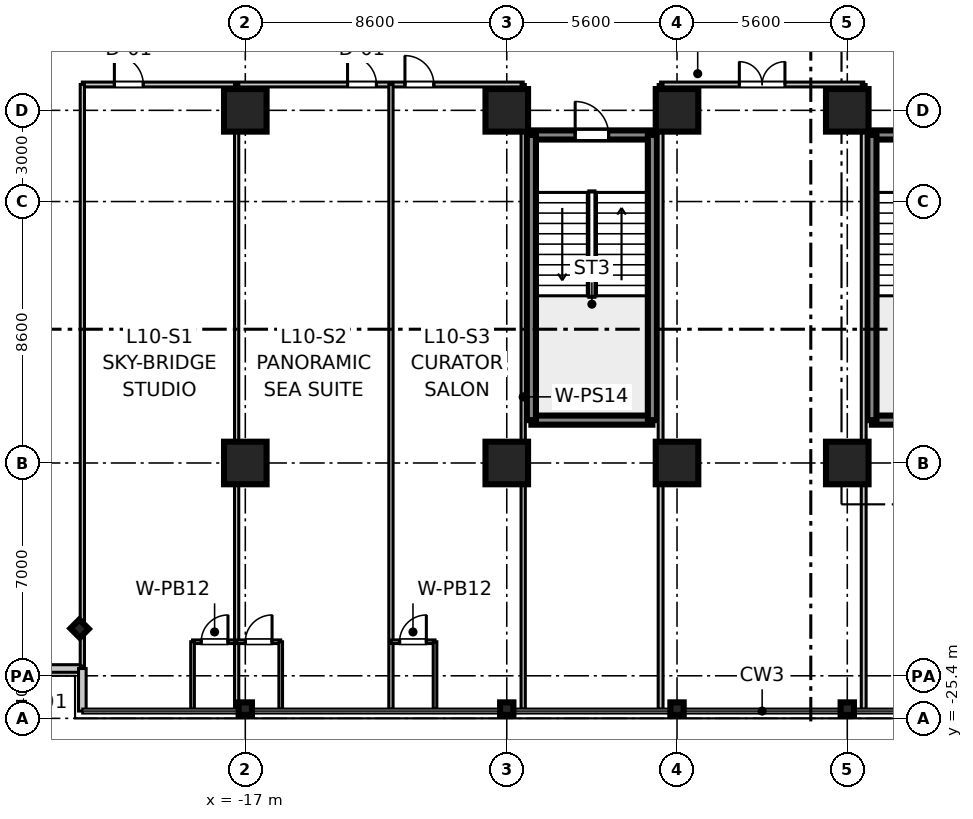
"""IFC4 building model, lengths in metres.
Left out: names, types, materials, properties, quantities, classifications, styles, units other than length and angle.
Written with IfcOpenShell. Run it as: python <this file> out.ifc"""

import sys

from ifc_helpers import new_model, si_unit, direction, frame, frame_2d, origin, origin_2d, place, context, subcontext, project, spatial, rectangle, i_section, extrude, source, transform, mapped, element, fill, save


model = new_model("IFC4")
c1 = context("Model", 3, precision=1e-05, world=origin(), true_north=direction((0.0, 1.0)))
c2 = subcontext(c1, "Body", "Model", "MODEL_VIEW")
j1 = project(units=[si_unit("LENGTHUNIT", "METRE"), si_unit("PLANEANGLEUNIT", "RADIAN")], contexts=[c1])
p1 = place(None, origin())
s1 = spatial("IfcSite", under=j1, at=p1, CompositionType="ELEMENT")
p2 = place(p1, origin())
s2 = spatial("IfcBuilding", under=s1, at=p2, CompositionType="ELEMENT")
p3 = place(p2, frame((0.0, 0.0, 47.0)))
s3 = spatial("IfcBuildingStorey", under=s2, at=p3, CompositionType="ELEMENT", Elevation=47.0)
m1 = source(origin(), c2, "Body", "SweptSolid", [
    extrude(rectangle(XDim=1.4, YDim=1.4, at=origin_2d()), origin(), (0.0, 0.0, 1.0), 3.605),
])
for number, where, z_axis, x_axis in (
    (1, (-17.0, -17.0, 0.0), (0.0, 0.0, 1.0), (1.0, 0.0, 0.0)),
    (2, (-17.0, -5.4, 0.0), (0.0, 0.0, 1.0), (1.0, 0.0, 0.0)),
    (3, (-8.4, -17.0, 0.0), (0.0, 0.0, 1.0), (1.0, 0.0, 0.0)),
    (4, (-8.4, -5.4, 0.0), (0.0, 0.0, 1.0), (1.0, 0.0, 0.0)),
    (5, (-2.8, -17.0, 0.0), (0.0, 0.0, 1.0), (1.0, 0.0, 0.0)),
    (6, (-2.8, -5.4, 0.0), (0.0, 0.0, 1.0), (1.0, 0.0, 0.0)),
    (7, (2.8, -17.0, 0.0), (0.0, 0.0, 1.0), (1.0, 0.0, 0.0)),
    (8, (2.8, -5.4, 0.0), (0.0, 0.0, 1.0), (1.0, 0.0, 0.0)),
):
    element("IfcColumn", number, at=place(p3, frame(where, z_axis=z_axis, x_axis=x_axis)), inside=s3, PredefinedType="COLUMN", context=c2, shape_type="MappedRepresentation", body=[
        mapped(m1, transform((0.0, 0.0, 0.0), scale=1.0)),
    ])
m2 = source(origin(), c2, "Body", "SweptSolid", [
    extrude(i_section(OverallWidth=0.412, OverallDepth=0.438, WebThickness=0.023, FlangeThickness=0.036, at=origin_2d()), origin(), (0.0, 0.0, 1.0), 3.605),
])
for number, where, z_axis, x_axis in (
    (9, (-17.0, -25.08, 0.0), (0.0, 0.0, 1.0), (0.0, 1.0, 0.0)),
    (10, (-8.4, -25.08, 0.0), (0.0, 0.0, 1.0), (0.0, 1.0, 0.0)),
    (11, (-2.8, -25.08, 0.0), (0.0, 0.0, 1.0), (0.0, 1.0, 0.0)),
    (12, (2.8, -25.08, 0.0), (0.0, 0.0, 1.0), (0.0, 1.0, 0.0)),
    (13, (-22.45, -22.45, 0.0), (0.0, 0.0, 1.0), (0.707, 0.707, 0.0)),
):
    element("IfcColumn", number, at=place(p3, frame(where, z_axis=z_axis, x_axis=x_axis)), inside=s3, PredefinedType="COLUMN", context=c2, shape_type="MappedRepresentation", body=[
        mapped(m2, transform((0.0, 0.0, 0.0), scale=1.0)),
    ])
m3 = source(origin(), c2, "Body", "SweptSolid", [
    extrude(rectangle(XDim=3.98, YDim=0.3, at=frame_2d((1.99, 0.0))), origin(), (0.0, 0.0, 1.0), 3.37),
])
for number, where, z_axis, x_axis in (
    (14, (3.61, -15.59, 0.0), (0.0, 0.0, 1.0), (1.0, 0.0, 0.0)),
    (15, (3.61, -6.21, 0.0), (0.0, 0.0, 1.0), (1.0, 0.0, 0.0)),
):
    element("IfcWall", number, at=place(p3, frame(where, z_axis=z_axis, x_axis=x_axis)), inside=s3, PredefinedType="SHEAR", context=c2, shape_type="MappedRepresentation", body=[
        mapped(m3, transform((0.0, 0.0, 0.0), scale=1.0)),
    ])
m4 = source(origin(), c2, "Body", "SweptSolid", [
    extrude(rectangle(XDim=9.38, YDim=0.3, at=frame_2d((4.69, 0.0))), origin(), (0.0, 0.0, 1.0), 3.37),
])
p4 = place(p3, frame((3.61, -15.59, 0.0), z_axis=(0.0, 0.0, 1.0), x_axis=(0.0, 1.0, 0.0)))
e16 = element("IfcWall", 16, at=p4, inside=s3, PredefinedType="SHEAR", context=c2, shape_type="MappedRepresentation", body=[
    mapped(m4, transform((0.0, 0.0, 0.0), scale=1.0)),
])
p5 = place(p3, frame((-7.59, -15.59, 0.0), z_axis=(0.0, 0.0, 1.0), x_axis=(1.0, 0.0, 0.0)))
e17 = element("IfcWall", 17, at=p5, inside=s3, PredefinedType="SHEAR", context=c2, shape_type="MappedRepresentation", body=[
    mapped(m3, transform((0.0, 0.0, 0.0), scale=1.0)),
])
p6 = place(p3, frame((-7.59, -6.21, 0.0), z_axis=(0.0, 0.0, 1.0), x_axis=(1.0, 0.0, 0.0)))
e18 = element("IfcWall", 18, at=p6, inside=s3, PredefinedType="SHEAR", context=c2, shape_type="MappedRepresentation", body=[
    mapped(m3, transform((0.0, 0.0, 0.0), scale=1.0)),
])
p7 = place(p6, frame((1.44, 0.0, 0.0)))
e19 = element("IfcOpeningElement", 19, at=p7, cuts=e18, PredefinedType="OPENING", context=c2, shape_type="SweptSolid", body=[
    extrude(rectangle(XDim=1.1, YDim=2.15, at=frame_2d((0.55, 1.075))), frame((0.0, 0.16, 0.0), z_axis=(0.0, -1.0, 0.0), x_axis=(1.0, 0.0, 0.0)), (0.0, 0.0, 1.0), 0.32),
])
for number, where, z_axis, x_axis in (
    (20, (-7.59, -15.59, 0.0), (0.0, 0.0, 1.0), (0.0, 1.0, 0.0)),
    (21, (-3.61, -15.59, 0.0), (0.0, 0.0, 1.0), (0.0, 1.0, 0.0)),
):
    element("IfcWall", number, at=place(p3, frame(where, z_axis=z_axis, x_axis=x_axis)), inside=s3, PredefinedType="SHEAR", context=c2, shape_type="MappedRepresentation", body=[
        mapped(m4, transform((0.0, 0.0, 0.0), scale=1.0)),
    ])
m5 = source(origin(), c2, "Body", "SweptSolid", [
    extrude(rectangle(XDim=1.4, YDim=0.25, at=frame_2d((0.7, 0.0))), origin(), (0.0, 0.0, 1.0), 3.37),
])
for number, where, z_axis, x_axis in (
    (22, (-23.76, -23.76, 0.0), (0.0, 0.0, 1.0), (1.0, 0.0, 0.0)),
    (23, (-22.36, -25.16, 0.0), (0.0, 0.0, 1.0), (0.0, 1.0, 0.0)),
):
    element("IfcWall", number, at=place(p3, frame(where, z_axis=z_axis, x_axis=x_axis)), inside=s3, PredefinedType="STANDARD", context=c2, shape_type="MappedRepresentation", body=[
        mapped(m5, transform((0.0, 0.0, 0.0), scale=1.0)),
    ])
m6 = source(origin(), c2, "Body", "SweptSolid", [
    extrude(rectangle(XDim=14.5, YDim=0.16, at=frame_2d((7.25, 0.0))), origin(), (0.0, 0.0, 1.0), 2.71),
])
p8 = place(p3, frame((-22.36, -4.55, 0.0), z_axis=(0.0, 0.0, 1.0), x_axis=(1.0, 0.0, 0.0)))
e24 = element("IfcWall", 24, at=p8, inside=s3, PredefinedType="PARTITIONING", context=c2, shape_type="MappedRepresentation", body=[
    mapped(m6, transform((0.0, 0.0, 0.0), scale=1.0)),
])
p9 = place(p8, frame((1.054, 0.0, 0.0)))
e25 = element("IfcOpeningElement", 25, at=p9, cuts=e24, PredefinedType="OPENING", context=c2, shape_type="SweptSolid", body=[
    extrude(rectangle(XDim=0.95, YDim=2.1, at=frame_2d((0.475, 1.05))), frame((0.0, 0.09, 0.0), z_axis=(0.0, -1.0, 0.0), x_axis=(1.0, 0.0, 0.0)), (0.0, 0.0, 1.0), 0.18),
])
p10 = place(p8, frame((8.723, 0.0, 0.0)))
e26 = element("IfcOpeningElement", 26, at=p10, cuts=e24, PredefinedType="OPENING", context=c2, shape_type="SweptSolid", body=[
    extrude(rectangle(XDim=0.95, YDim=2.1, at=frame_2d((0.475, 1.05))), frame((0.0, 0.09, 0.0), z_axis=(0.0, -1.0, 0.0), x_axis=(1.0, 0.0, 0.0)), (0.0, 0.0, 1.0), 0.18),
])
p11 = place(p8, frame((10.611, 0.0, 0.0)))
e27 = element("IfcOpeningElement", 27, at=p11, cuts=e24, PredefinedType="OPENING", context=c2, shape_type="SweptSolid", body=[
    extrude(rectangle(XDim=0.95, YDim=2.1, at=frame_2d((0.475, 1.05))), frame((0.0, 0.09, 0.0), z_axis=(0.0, -1.0, 0.0), x_axis=(1.0, 0.0, 0.0)), (0.0, 0.0, 1.0), 0.18),
])
m7 = source(origin(), c2, "Body", "SweptSolid", [
    extrude(rectangle(XDim=19.13, YDim=0.14, at=frame_2d((9.565, 0.0))), origin(), (0.0, 0.0, 1.0), 2.71),
])
p12 = place(p3, frame((-22.36, -23.68, 0.0), z_axis=(0.0, 0.0, 1.0), x_axis=(0.0, 1.0, 0.0)))
e28 = element("IfcWall", 28, at=p12, inside=s3, PredefinedType="PARTITIONING", context=c2, shape_type="MappedRepresentation", body=[
    mapped(m7, transform((0.0, 0.0, 0.0), scale=1.0)),
])
m8 = source(origin(), c2, "Body", "SweptSolid", [
    extrude(rectangle(XDim=20.55, YDim=0.14, at=frame_2d((10.275, 0.0))), origin(), (0.0, 0.0, 1.0), 2.71),
])
p13 = place(p3, frame((-7.86, -25.1, 0.0), z_axis=(0.0, 0.0, 1.0), x_axis=(0.0, 1.0, 0.0)))
e29 = element("IfcWall", 29, at=p13, inside=s3, PredefinedType="PARTITIONING", context=c2, shape_type="MappedRepresentation", body=[
    mapped(m8, transform((0.0, 0.0, 0.0), scale=1.0)),
])
m9 = source(origin(), c2, "Body", "SweptSolid", [
    extrude(rectangle(XDim=1.45, YDim=0.12, at=frame_2d((0.725, 0.0))), origin(), (0.0, 0.0, 1.0), 2.71),
])
p14 = place(p3, frame((-18.735, -22.88, 0.0), z_axis=(0.0, 0.0, 1.0), x_axis=(1.0, 0.0, 0.0)))
e30 = element("IfcWall", 30, at=p14, inside=s3, PredefinedType="PARTITIONING", context=c2, shape_type="MappedRepresentation", body=[
    mapped(m9, transform((0.0, 0.0, 0.0), scale=1.0)),
])
p15 = place(p14, frame((0.285, 0.0, 0.0)))
e31 = element("IfcOpeningElement", 31, at=p15, cuts=e30, PredefinedType="OPENING", context=c2, shape_type="SweptSolid", body=[
    extrude(rectangle(XDim=0.88, YDim=2.1, at=frame_2d((0.44, 1.05))), frame((0.0, 0.07, 0.0), z_axis=(0.0, -1.0, 0.0), x_axis=(1.0, 0.0, 0.0)), (0.0, 0.0, 1.0), 0.14),
])
m10 = source(origin(), c2, "Body", "SweptSolid", [
    extrude(rectangle(XDim=2.22, YDim=0.12, at=frame_2d((1.11, 0.0))), origin(), (0.0, 0.0, 1.0), 2.71),
])
p16 = place(p3, frame((-18.735, -25.1, 0.0), z_axis=(0.0, 0.0, 1.0), x_axis=(0.0, 1.0, 0.0)))
e32 = element("IfcWall", 32, at=p16, inside=s3, PredefinedType="PARTITIONING", context=c2, shape_type="MappedRepresentation", body=[
    mapped(m10, transform((0.0, 0.0, 0.0), scale=1.0)),
])
p17 = place(p3, frame((-17.285, -25.1, 0.0), z_axis=(0.0, 0.0, 1.0), x_axis=(0.0, 1.0, 0.0)))
e33 = element("IfcWall", 33, at=p17, inside=s3, PredefinedType="PARTITIONING", context=c2, shape_type="MappedRepresentation", body=[
    mapped(m8, transform((0.0, 0.0, 0.0), scale=1.0)),
])
m11 = source(origin(), c2, "Body", "SweptSolid", [
    extrude(rectangle(XDim=1.45, YDim=0.12, at=frame_2d((0.725, 0.0))), origin(), (0.0, 0.0, 1.0), 2.71),
])
p18 = place(p3, frame((-17.285, -22.88, 0.0), z_axis=(0.0, 0.0, 1.0), x_axis=(1.0, 0.0, 0.0)))
e34 = element("IfcWall", 34, at=p18, inside=s3, PredefinedType="PARTITIONING", context=c2, shape_type="MappedRepresentation", body=[
    mapped(m11, transform((0.0, 0.0, 0.0), scale=1.0)),
])
p19 = place(p18, frame((0.285, 0.0, 0.0)))
e35 = element("IfcOpeningElement", 35, at=p19, cuts=e34, PredefinedType="OPENING", context=c2, shape_type="SweptSolid", body=[
    extrude(rectangle(XDim=0.88, YDim=2.1, at=frame_2d((0.44, 1.05))), frame((0.0, 0.07, 0.0), z_axis=(0.0, -1.0, 0.0), x_axis=(1.0, 0.0, 0.0)), (0.0, 0.0, 1.0), 0.14),
])
p20 = place(p3, frame((-15.835, -25.1, 0.0), z_axis=(0.0, 0.0, 1.0), x_axis=(0.0, 1.0, 0.0)))
e36 = element("IfcWall", 36, at=p20, inside=s3, PredefinedType="PARTITIONING", context=c2, shape_type="MappedRepresentation", body=[
    mapped(m10, transform((0.0, 0.0, 0.0), scale=1.0)),
])
p21 = place(p3, frame((-12.21, -25.1, 0.0), z_axis=(0.0, 0.0, 1.0), x_axis=(0.0, 1.0, 0.0)))
e37 = element("IfcWall", 37, at=p21, inside=s3, PredefinedType="PARTITIONING", context=c2, shape_type="MappedRepresentation", body=[
    mapped(m8, transform((0.0, 0.0, 0.0), scale=1.0)),
])
p22 = place(p3, frame((-12.21, -22.88, 0.0), z_axis=(0.0, 0.0, 1.0), x_axis=(1.0, 0.0, 0.0)))
e38 = element("IfcWall", 38, at=p22, inside=s3, PredefinedType="PARTITIONING", context=c2, shape_type="MappedRepresentation", body=[
    mapped(m11, transform((0.0, 0.0, 0.0), scale=1.0)),
])
p23 = place(p22, frame((0.285, 0.0, 0.0)))
e39 = element("IfcOpeningElement", 39, at=p23, cuts=e38, PredefinedType="OPENING", context=c2, shape_type="SweptSolid", body=[
    extrude(rectangle(XDim=0.88, YDim=2.1, at=frame_2d((0.44, 1.05))), frame((0.0, 0.07, 0.0), z_axis=(0.0, -1.0, 0.0), x_axis=(1.0, 0.0, 0.0)), (0.0, 0.0, 1.0), 0.14),
])
p24 = place(p3, frame((-10.76, -25.1, 0.0), z_axis=(0.0, 0.0, 1.0), x_axis=(0.0, 1.0, 0.0)))
e40 = element("IfcWall", 40, at=p24, inside=s3, PredefinedType="PARTITIONING", context=c2, shape_type="MappedRepresentation", body=[
    mapped(m10, transform((0.0, 0.0, 0.0), scale=1.0)),
])
m12 = source(origin(), c2, "Body", "SweptSolid", [
    extrude(rectangle(XDim=6.68, YDim=0.16, at=frame_2d((3.34, 0.0))), origin(), (0.0, 0.0, 1.0), 2.71),
])
p25 = place(p3, frame((-3.34, -4.55, 0.0), z_axis=(0.0, 0.0, 1.0), x_axis=(1.0, 0.0, 0.0)))
e41 = element("IfcWall", 41, at=p25, inside=s3, PredefinedType="PARTITIONING", context=c2, shape_type="MappedRepresentation", body=[
    mapped(m12, transform((0.0, 0.0, 0.0), scale=1.0)),
])
p26 = place(p25, frame((2.59, 0.0, 0.0)))
e42 = element("IfcOpeningElement", 42, at=p26, cuts=e41, PredefinedType="OPENING", context=c2, shape_type="SweptSolid", body=[
    extrude(rectangle(XDim=1.5, YDim=2.15, at=frame_2d((0.75, 1.075))), frame((0.0, 0.09, 0.0), z_axis=(0.0, -1.0, 0.0), x_axis=(1.0, 0.0, 0.0)), (0.0, 0.0, 1.0), 0.18),
])
m13 = source(origin(), c2, "Body", "SweptSolid", [
    extrude(rectangle(XDim=20.55, YDim=0.16, at=frame_2d((10.275, 0.0))), origin(), (0.0, 0.0, 1.0), 2.71),
])
for number, where, z_axis, x_axis in (
    (43, (-3.34, -25.1, 0.0), (0.0, 0.0, 1.0), (0.0, 1.0, 0.0)),
    (44, (3.34, -25.1, 0.0), (0.0, 0.0, 1.0), (0.0, 1.0, 0.0)),
):
    element("IfcWall", number, at=place(p3, frame(where, z_axis=z_axis, x_axis=x_axis)), inside=s3, PredefinedType="PARTITIONING", context=c2, shape_type="MappedRepresentation", body=[
        mapped(m13, transform((0.0, 0.0, 0.0), scale=1.0)),
    ])
m14 = source(origin(), c2, "Body", "SweptSolid", [
    extrude(rectangle(XDim=1.1, YDim=2.15, at=frame_2d((0.55, 1.075))), frame((0.0, 0.025, 0.0), z_axis=(0.0, -1.0, 0.0), x_axis=(1.0, 0.0, 0.0)), (0.0, 0.0, 1.0), 0.05),
])
p27 = place(p7, frame((1.1, 0.0, 0.0), z_axis=(0.0, 0.0, 1.0), x_axis=(-1.0, 0.0, 0.0)))
e45 = element("IfcDoor", 45, at=p27, inside=s3, OperationType="SINGLE_SWING_LEFT", PredefinedType="DOOR", context=c2, shape_type="MappedRepresentation", body=[
    mapped(m14, transform((0.0, 0.0, 0.0), scale=1.0)),
])
fill(e19, e45)
m15 = source(origin(), c2, "Body", "SweptSolid", [
    extrude(rectangle(XDim=0.88, YDim=2.1, at=frame_2d((0.44, 1.05))), frame((0.0, 0.025, 0.0), z_axis=(0.0, -1.0, 0.0), x_axis=(1.0, 0.0, 0.0)), (0.0, 0.0, 1.0), 0.05),
])
p28 = place(p15, frame((0.88, 0.0, 0.0), z_axis=(0.0, 0.0, 1.0), x_axis=(-1.0, 0.0, 0.0)))
e46 = element("IfcDoor", 46, at=p28, inside=s3, OperationType="SINGLE_SWING_RIGHT", PredefinedType="DOOR", context=c2, shape_type="MappedRepresentation", body=[
    mapped(m15, transform((0.0, 0.0, 0.0), scale=1.0)),
])
fill(e31, e46)
m16 = source(origin(), c2, "Body", "SweptSolid", [
    extrude(rectangle(XDim=0.95, YDim=2.1, at=frame_2d((0.475, 1.05))), frame((0.0, 0.025, 0.0), z_axis=(0.0, -1.0, 0.0), x_axis=(1.0, 0.0, 0.0)), (0.0, 0.0, 1.0), 0.05),
])
p29 = place(p9, frame((0.95, 0.0, 0.0), z_axis=(0.0, 0.0, 1.0), x_axis=(-1.0, 0.0, 0.0)))
e47 = element("IfcDoor", 47, at=p29, inside=s3, OperationType="SINGLE_SWING_LEFT", PredefinedType="DOOR", context=c2, shape_type="MappedRepresentation", body=[
    mapped(m16, transform((0.0, 0.0, 0.0), scale=1.0)),
])
fill(e25, e47)
p30 = place(p19, frame((0.88, 0.0, 0.0), z_axis=(0.0, 0.0, 1.0), x_axis=(-1.0, 0.0, 0.0)))
e48 = element("IfcDoor", 48, at=p30, inside=s3, OperationType="SINGLE_SWING_RIGHT", PredefinedType="DOOR", context=c2, shape_type="MappedRepresentation", body=[
    mapped(m15, transform((0.0, 0.0, 0.0), scale=1.0)),
])
fill(e35, e48)
p31 = place(p10, frame((0.95, 0.0, 0.0), z_axis=(0.0, 0.0, 1.0), x_axis=(-1.0, 0.0, 0.0)))
e49 = element("IfcDoor", 49, at=p31, inside=s3, OperationType="SINGLE_SWING_LEFT", PredefinedType="DOOR", context=c2, shape_type="MappedRepresentation", body=[
    mapped(m16, transform((0.0, 0.0, 0.0), scale=1.0)),
])
fill(e26, e49)
p32 = place(p23, frame((0.88, 0.0, 0.0), z_axis=(0.0, 0.0, 1.0), x_axis=(-1.0, 0.0, 0.0)))
e50 = element("IfcDoor", 50, at=p32, inside=s3, OperationType="SINGLE_SWING_RIGHT", PredefinedType="DOOR", context=c2, shape_type="MappedRepresentation", body=[
    mapped(m15, transform((0.0, 0.0, 0.0), scale=1.0)),
])
fill(e39, e50)
p33 = place(p11, frame((0.95, 0.0, 0.0), z_axis=(0.0, 0.0, 1.0), x_axis=(-1.0, 0.0, 0.0)))
e51 = element("IfcDoor", 51, at=p33, inside=s3, OperationType="SINGLE_SWING_LEFT", PredefinedType="DOOR", context=c2, shape_type="MappedRepresentation", body=[
    mapped(m16, transform((0.0, 0.0, 0.0), scale=1.0)),
])
fill(e27, e51)
m17 = source(origin(), c2, "Body", "SweptSolid", [
    extrude(rectangle(XDim=1.5, YDim=2.15, at=frame_2d((0.75, 1.075))), frame((0.0, 0.025, 0.0), z_axis=(0.0, -1.0, 0.0), x_axis=(1.0, 0.0, 0.0)), (0.0, 0.0, 1.0), 0.05),
])
p34 = place(p26, frame((1.5, 0.0, 0.0), z_axis=(0.0, 0.0, 1.0), x_axis=(-1.0, 0.0, 0.0)))
e52 = element("IfcDoor", 52, at=p34, inside=s3, OperationType="DOUBLE_DOOR_SINGLE_SWING", PredefinedType="DOOR", context=c2, shape_type="MappedRepresentation", body=[
    mapped(m17, transform((0.0, 0.0, 0.0), scale=1.0)),
])
fill(e42, e52)
save(model, sys.argv[1])
